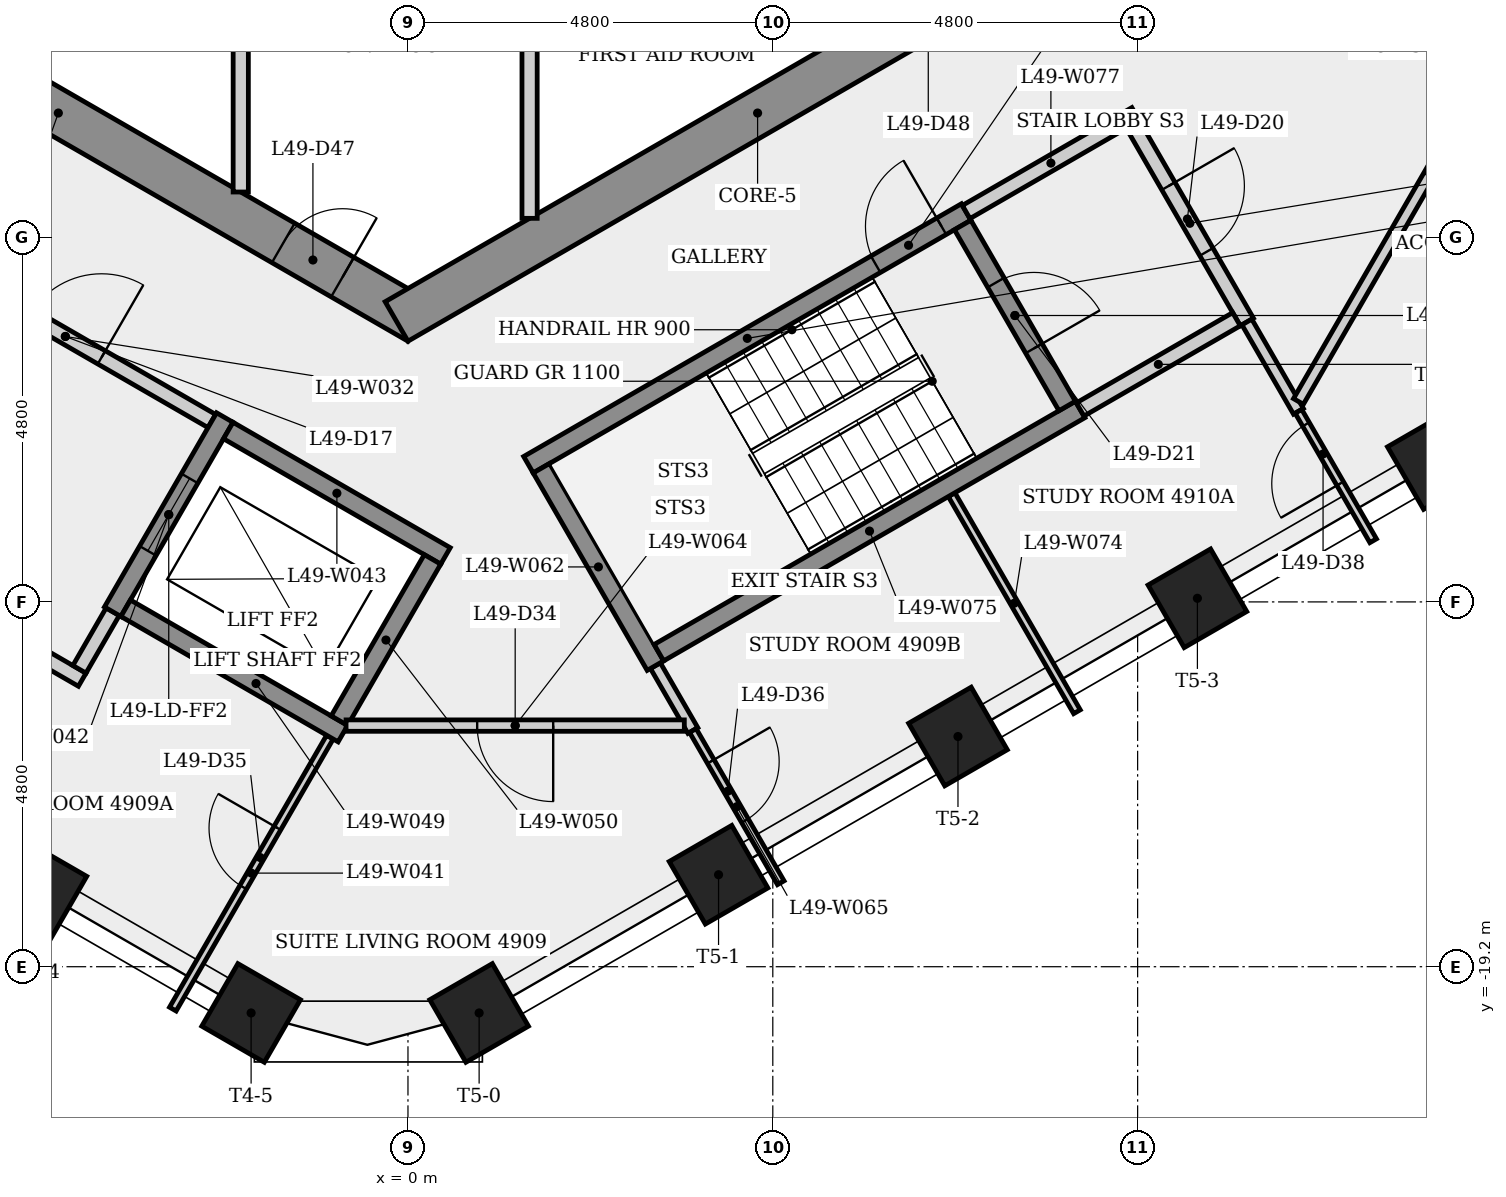
"""IFC4 building model, lengths in metres.
Left out: names, types, materials, properties, quantities, classifications, styles, units other than length and angle.
Written with IfcOpenShell. Run it as: python <this file> out.ifc"""

import sys

from ifc_helpers import new_model, si_unit, direction, frame, frame_2d, origin, origin_2d, place, context, subcontext, project, spatial, rectangle, extrude, element, fill, save


model = new_model("IFC4")
c1 = context("Model", 3, precision=1e-05, world=origin(), true_north=direction((0.0, 1.0)))
c2 = subcontext(c1, "Body", "Model", "MODEL_VIEW")
j1 = project(units=[si_unit("LENGTHUNIT", "METRE"), si_unit("PLANEANGLEUNIT", "RADIAN")], contexts=[c1])
p1 = place(None, origin())
s1 = spatial("IfcSite", under=j1, at=p1, CompositionType="ELEMENT")
p2 = place(p1, origin())
s2 = spatial("IfcBuilding", under=s1, at=p2, CompositionType="ELEMENT")
p3 = place(p2, frame((0.0, 0.0, 183.3)))
s3 = spatial("IfcBuildingStorey", under=s2, at=p3, CompositionType="ELEMENT", Elevation=183.3)
p4 = place(p3, frame((-9.35, -5.225, 0.0), z_axis=(0.0, 0.0, 1.0), x_axis=(0.866023993627, -0.500002442456, 0.0)))
e1 = element("IfcWall", 1, at=p4, inside=s3, PredefinedType="SHEAR", context=c2, shape_type="SweptSolid", body=[
    extrude(rectangle(XDim=10.97, YDim=0.6, at=frame_2d((5.485, 0.0))), origin(), (0.0, 0.0, 1.0), 3.4),
])
p5 = place(p4, frame((3.777, 0.0, 0.0)))
e2 = element("IfcOpeningElement", 2, at=p5, cuts=e1, PredefinedType="OPENING", context=c2, shape_type="SweptSolid", body=[
    extrude(rectangle(XDim=0.9, YDim=2.1, at=frame_2d((0.45, 1.05))), frame((0.0, 0.31, 0.0), z_axis=(0.0, -1.0, 0.0), x_axis=(1.0, 0.0, 0.0)), (0.0, 0.0, 1.0), 0.62),
])
p6 = place(p4, frame((8.903, 0.0, 0.0)))
e3 = element("IfcOpeningElement", 3, at=p6, cuts=e1, PredefinedType="OPENING", context=c2, shape_type="SweptSolid", body=[
    extrude(rectangle(XDim=0.9, YDim=2.1, at=frame_2d((0.45, 1.05))), frame((0.0, 0.31, 0.0), z_axis=(0.0, -1.0, 0.0), x_axis=(1.0, 0.0, 0.0)), (0.0, 0.0, 1.0), 0.62),
])
p7 = place(p3, frame((-0.15, -10.71, 0.0), z_axis=(0.0, 0.0, 1.0), x_axis=(0.866023993627, 0.500002442456, 0.0)))
e4 = element("IfcWall", 4, at=p7, inside=s3, PredefinedType="SHEAR", context=c2, shape_type="SweptSolid", body=[
    extrude(rectangle(XDim=10.97, YDim=0.6, at=frame_2d((5.485, 0.0))), origin(), (0.0, 0.0, 1.0), 3.4),
])
p8 = place(p7, frame((7.628, 0.0, 0.0)))
e5 = element("IfcOpeningElement", 5, at=p8, cuts=e4, PredefinedType="OPENING", context=c2, shape_type="SweptSolid", body=[
    extrude(rectangle(XDim=0.9, YDim=2.1, at=frame_2d((0.45, 1.05))), frame((0.0, 0.31, 0.0), z_axis=(0.0, -1.0, 0.0), x_axis=(1.0, 0.0, 0.0)), (0.0, 0.0, 1.0), 0.62),
])
for number, where, z_axis, x_axis in (
    (6, (-4.875, -18.185, 0.0), (0.0, 0.0, 1.0), (-0.5, -0.866, 0.0)),
    (7, (-2.064, -19.808, 0.0), (0.0, 0.0, 1.0), (-0.5, -0.866, 0.0)),
    (8, (0.936, -19.808, 0.0), (0.0, 0.0, 1.0), (0.5, -0.866, 0.0)),
    (9, (4.086, -17.99, 0.0), (0.0, 0.0, 1.0), (0.5, -0.866, 0.0)),
    (10, (7.236, -16.171, 0.0), (0.0, 0.0, 1.0), (0.5, -0.866, 0.0)),
    (11, (10.386, -14.352, 0.0), (0.0, 0.0, 1.0), (0.5, -0.866, 0.0)),
    (12, (13.536, -12.534, 0.0), (0.0, 0.0, 1.0), (0.5, -0.866, 0.0)),
):
    element("IfcColumn", number, at=place(p3, frame(where, z_axis=z_axis, x_axis=x_axis)), inside=s3, PredefinedType="COLUMN", context=c2, shape_type="SweptSolid", body=[
        extrude(rectangle(XDim=0.95, YDim=0.95, at=origin_2d()), origin(), (0.0, 0.0, 1.0), 3.4),
    ])
p9 = place(p3, frame((-8.356, -13.073, 0.0), z_axis=(0.0, 0.0, 1.0), x_axis=(0.866038532462, -0.499977259774, 0.0)))
e13 = element("IfcWall", 13, at=p9, inside=s3, PredefinedType="PARTITIONING", context=c2, shape_type="SweptSolid", body=[
    extrude(rectangle(XDim=4.7, YDim=0.2, at=frame_2d((2.35, 0.0))), origin(), (0.0, 0.0, 1.0), 3.0),
])
p10 = place(p3, frame((-6.435, -9.795, 0.0), z_axis=(0.0, 0.0, 1.0), x_axis=(0.866012907634, -0.500021643343, 0.0)))
e14 = element("IfcWall", 14, at=p10, inside=s3, PredefinedType="PARTITIONING", context=c2, shape_type="SweptSolid", body=[
    extrude(rectangle(XDim=4.45, YDim=0.2, at=frame_2d((2.225, 0.0))), origin(), (0.0, 0.0, 1.0), 3.0),
])
p11 = place(p10, frame((1.675, 0.0, 0.0)))
e15 = element("IfcOpeningElement", 15, at=p11, cuts=e14, PredefinedType="OPENING", context=c2, shape_type="SweptSolid", body=[
    extrude(rectangle(XDim=1.1, YDim=2.1, at=frame_2d((0.55, 1.05))), frame((0.0, 0.11, 0.0), z_axis=(0.0, -1.0, 0.0), x_axis=(1.0, 0.0, 0.0)), (0.0, 0.0, 1.0), 0.22),
])
p12 = place(p3, frame((-3.885, -14.529, 0.0), z_axis=(0.0, 0.0, 1.0), x_axis=(-0.499859285417, -0.866106630146, 0.0)))
e16 = element("IfcWall", 16, at=p12, inside=s3, PredefinedType="PARTITIONING", context=c2, shape_type="SweptSolid", body=[
    extrude(rectangle(XDim=0.875, YDim=0.2, at=frame_2d((0.438, 0.0))), origin(), (0.0, 0.0, 1.0), 3.0),
])
p13 = place(p3, frame((-3.094, -19.758, 0.0), z_axis=(0.0, 0.0, 1.0), x_axis=(0.500027577057, 0.866009481578, 0.0)))
e17 = element("IfcWall", 17, at=p13, inside=s3, PredefinedType="PARTITIONING", context=c2, shape_type="SweptSolid", body=[
    extrude(rectangle(XDim=4.133, YDim=0.1, at=frame_2d((2.066, 0.0))), origin(), (0.0, 0.0, 1.0), 3.0),
])
p14 = place(p13, frame((1.852, 0.0, 0.0)))
e18 = element("IfcOpeningElement", 18, at=p14, cuts=e17, PredefinedType="OPENING", context=c2, shape_type="SweptSolid", body=[
    extrude(rectangle(XDim=0.9, YDim=2.1, at=frame_2d((0.45, 1.05))), frame((0.0, 0.06, 0.0), z_axis=(0.0, -1.0, 0.0), x_axis=(1.0, 0.0, 0.0)), (0.0, 0.0, 1.0), 0.12),
])
p15 = place(p3, frame((-2.41, -11.974, 0.0), z_axis=(0.0, 0.0, 1.0), x_axis=(-0.500001826776, -0.866024349092, 0.0)))
e19 = element("IfcWall", 19, at=p15, inside=s3, PredefinedType="SHEAR", context=c2, shape_type="SweptSolid", body=[
    extrude(rectangle(XDim=2.95, YDim=0.25, at=frame_2d((1.475, 0.0))), origin(), (0.0, 0.0, 1.0), 3.0),
])
p16 = place(p15, frame((0.925, 0.0, 0.0)))
e20 = element("IfcOpeningElement", 20, at=p16, cuts=e19, PredefinedType="OPENING", context=c2, shape_type="SweptSolid", body=[
    extrude(rectangle(XDim=1.1, YDim=2.1, at=frame_2d((0.55, 1.05))), frame((0.0, 0.135, 0.0), z_axis=(0.0, -1.0, 0.0), x_axis=(1.0, 0.0, 0.0)), (0.0, 0.0, 1.0), 0.27),
])
p17 = place(p3, frame((-2.364, -12.145, 0.0), z_axis=(0.0, 0.0, 1.0), x_axis=(0.866040211805, -0.499974350878, 0.0)))
e21 = element("IfcWall", 21, at=p17, inside=s3, PredefinedType="SHEAR", context=c2, shape_type="SweptSolid", body=[
    extrude(rectangle(XDim=3.3, YDim=0.25, at=frame_2d((1.65, 0.0))), origin(), (0.0, 0.0, 1.0), 3.0),
])
p18 = place(p3, frame((-2.2, -5.25, 0.0), z_axis=(0.0, 0.0, 1.0), x_axis=(0.0, -1.0, 0.0)))
e22 = element("IfcWall", 22, at=p18, inside=s3, PredefinedType="PARTITIONING", context=c2, shape_type="SweptSolid", body=[
    extrude(rectangle(XDim=3.757, YDim=0.2, at=frame_2d((1.878, 0.0))), origin(), (0.0, 0.0, 1.0), 3.0),
])
p19 = place(p3, frame((-0.856, -16.133, 0.0), z_axis=(0.0, 0.0, 1.0), x_axis=(-0.866021716278, 0.500006386895, 0.0)))
e23 = element("IfcWall", 23, at=p19, inside=s3, PredefinedType="SHEAR", context=c2, shape_type="SweptSolid", body=[
    extrude(rectangle(XDim=3.3, YDim=0.25, at=frame_2d((1.65, 0.0))), origin(), (0.0, 0.0, 1.0), 3.0),
])
p20 = place(p3, frame((-0.902, -15.962, 0.0), z_axis=(0.0, 0.0, 1.0), x_axis=(0.500061746146, 0.865989751695, 0.0)))
e24 = element("IfcWall", 24, at=p20, inside=s3, PredefinedType="SHEAR", context=c2, shape_type="SweptSolid", body=[
    extrude(rectangle(XDim=2.45, YDim=0.25, at=frame_2d((1.225, 0.0))), origin(), (0.0, 0.0, 1.0), 3.4),
])
p21 = place(p3, frame((1.6, -5.25, 0.0), z_axis=(0.0, 0.0, 1.0), x_axis=(0.0, -1.0, 0.0)))
e25 = element("IfcWall", 25, at=p21, inside=s3, PredefinedType="PARTITIONING", context=c2, shape_type="SweptSolid", body=[
    extrude(rectangle(XDim=4.103, YDim=0.2, at=frame_2d((2.052, 0.0))), origin(), (0.0, 0.0, 1.0), 3.0),
])
p22 = place(p3, frame((1.585, -12.595, 0.0), z_axis=(0.0, 0.0, 1.0), x_axis=(0.866036417653, 0.499980922934, 0.0)))
e26 = element("IfcWall", 26, at=p22, inside=s3, PredefinedType="SHEAR", context=c2, shape_type="SweptSolid", body=[
    extrude(rectangle(XDim=6.65, YDim=0.25, at=frame_2d((3.325, 0.0))), origin(), (0.0, 0.0, 1.0), 3.0),
])
p23 = place(p22, frame((5.275, 0.0, 0.0)))
e27 = element("IfcOpeningElement", 27, at=p23, cuts=e26, PredefinedType="OPENING", context=c2, shape_type="SweptSolid", body=[
    extrude(rectangle(XDim=1.0, YDim=2.1, at=frame_2d((0.5, 1.05))), frame((0.0, 0.135, 0.0), z_axis=(0.0, -1.0, 0.0), x_axis=(1.0, 0.0, 0.0)), (0.0, 0.0, 1.0), 0.27),
])
p24 = place(p3, frame((3.256, -15.239, 0.0), z_axis=(0.0, 0.0, 1.0), x_axis=(0.499815364442, -0.866131976934, 0.0)))
e28 = element("IfcWall", 28, at=p24, inside=s3, PredefinedType="PARTITIONING", context=c2, shape_type="SweptSolid", body=[
    extrude(rectangle(XDim=0.986, YDim=0.15, at=frame_2d((0.493, 0.0))), origin(), (0.0, 0.0, 1.0), 3.0),
])
p25 = place(p3, frame((3.256, -15.239, 0.0), z_axis=(0.0, 0.0, 1.0), x_axis=(-0.50002537861, 0.866010750942, 0.0)))
e29 = element("IfcWall", 29, at=p25, inside=s3, PredefinedType="SHEAR", context=c2, shape_type="SweptSolid", body=[
    extrude(rectangle(XDim=3.0, YDim=0.25, at=frame_2d((1.5, 0.0))), origin(), (0.0, 0.0, 1.0), 3.0),
])
p26 = place(p3, frame((3.636, -16.028, 0.0), z_axis=(0.0, 0.0, 1.0), x_axis=(-1.0, 0.0, 0.0)))
e30 = element("IfcWall", 30, at=p26, inside=s3, PredefinedType="PARTITIONING", context=c2, shape_type="SweptSolid", body=[
    extrude(rectangle(XDim=4.451, YDim=0.15, at=frame_2d((2.225, 0.0))), origin(), (0.0, 0.0, 1.0), 3.0),
])
p27 = place(p26, frame((1.725, 0.0, 0.0)))
e31 = element("IfcOpeningElement", 31, at=p27, cuts=e30, PredefinedType="OPENING", context=c2, shape_type="SweptSolid", body=[
    extrude(rectangle(XDim=1.0, YDim=2.1, at=frame_2d((0.5, 1.05))), frame((0.0, 0.085, 0.0), z_axis=(0.0, -1.0, 0.0), x_axis=(1.0, 0.0, 0.0)), (0.0, 0.0, 1.0), 0.17),
])
p28 = place(p3, frame((3.748, -16.093, 0.0), z_axis=(0.0, 0.0, 1.0), x_axis=(0.500078837292, -0.865979882268, 0.0)))
e32 = element("IfcWall", 32, at=p28, inside=s3, PredefinedType="PARTITIONING", context=c2, shape_type="SweptSolid", body=[
    extrude(rectangle(XDim=2.313, YDim=0.1, at=frame_2d((1.156, 0.0))), origin(), (0.0, 0.0, 1.0), 3.0),
])
p29 = place(p28, frame((0.471, 0.0, 0.0)))
e33 = element("IfcOpeningElement", 33, at=p29, cuts=e32, PredefinedType="OPENING", context=c2, shape_type="SweptSolid", body=[
    extrude(rectangle(XDim=0.9, YDim=2.1, at=frame_2d((0.45, 1.05))), frame((0.0, 0.06, 0.0), z_axis=(0.0, -1.0, 0.0), x_axis=(1.0, 0.0, 0.0)), (0.0, 0.0, 1.0), 0.12),
])
p30 = place(p3, frame((7.153, -12.989, 0.0), z_axis=(0.0, 0.0, 1.0), x_axis=(0.500055614084, -0.865993292597, 0.0)))
e34 = element("IfcWall", 34, at=p30, inside=s3, PredefinedType="PARTITIONING", context=c2, shape_type="SweptSolid", body=[
    extrude(rectangle(XDim=3.298, YDim=0.1, at=frame_2d((1.649, 0.0))), origin(), (0.0, 0.0, 1.0), 3.0),
])
p31 = place(p3, frame((3.301, -15.068, 0.0), z_axis=(0.0, 0.0, 1.0), x_axis=(0.866035036182, 0.499983315828, 0.0)))
e35 = element("IfcWall", 35, at=p31, inside=s3, PredefinedType="SHEAR", context=c2, shape_type="SweptSolid", body=[
    extrude(rectangle(XDim=6.4, YDim=0.25, at=frame_2d((3.2, 0.0))), origin(), (0.0, 0.0, 1.0), 3.0),
])
p32 = place(p3, frame((7.298, -9.441, 0.0), z_axis=(0.0, 0.0, 1.0), x_axis=(0.500034990121, -0.866005201286, 0.0)))
e36 = element("IfcWall", 36, at=p32, inside=s3, PredefinedType="SHEAR", context=c2, shape_type="SweptSolid", body=[
    extrude(rectangle(XDim=2.75, YDim=0.25, at=frame_2d((1.375, 0.0))), origin(), (0.0, 0.0, 1.0), 3.0),
])
p33 = place(p32, frame((0.875, 0.0, 0.0)))
e37 = element("IfcOpeningElement", 37, at=p33, cuts=e36, PredefinedType="OPENING", context=c2, shape_type="SweptSolid", body=[
    extrude(rectangle(XDim=1.0, YDim=2.1, at=frame_2d((0.5, 1.05))), frame((0.0, 0.135, 0.0), z_axis=(0.0, -1.0, 0.0), x_axis=(1.0, 0.0, 0.0)), (0.0, 0.0, 1.0), 0.27),
])
p34 = place(p3, frame((7.344, -9.27, 0.0), z_axis=(0.0, 0.0, 1.0), x_axis=(0.866005588531, 0.500034319456, 0.0)))
e38 = element("IfcWall", 38, at=p34, inside=s3, PredefinedType="PARTITIONING", context=c2, shape_type="SweptSolid", body=[
    extrude(rectangle(XDim=2.575, YDim=0.2, at=frame_2d((1.288, 0.0))), origin(), (0.0, 0.0, 1.0), 3.0),
])
p35 = place(p3, frame((9.537, -8.119, 0.0), z_axis=(0.0, 0.0, 1.0), x_axis=(0.499990139034, -0.866031096941, 0.0)))
e39 = element("IfcWall", 39, at=p35, inside=s3, PredefinedType="PARTITIONING", context=c2, shape_type="SweptSolid", body=[
    extrude(rectangle(XDim=3.0, YDim=0.2, at=frame_2d((1.5, 0.0))), origin(), (0.0, 0.0, 1.0), 3.0),
])
p36 = place(p35, frame((0.935, 0.0, 0.0)))
e40 = element("IfcOpeningElement", 40, at=p36, cuts=e39, PredefinedType="OPENING", context=c2, shape_type="SweptSolid", body=[
    extrude(rectangle(XDim=1.0, YDim=2.1, at=frame_2d((0.5, 1.05))), frame((0.0, 0.11, 0.0), z_axis=(0.0, -1.0, 0.0), x_axis=(1.0, 0.0, 0.0)), (0.0, 0.0, 1.0), 0.22),
])
p37 = place(p3, frame((10.901, -10.681, 0.0), z_axis=(0.0, 0.0, 1.0), x_axis=(-0.866007538022, -0.500030943131, 0.0)))
e41 = element("IfcWall", 41, at=p37, inside=s3, PredefinedType="PARTITIONING", context=c2, shape_type="SweptSolid", body=[
    extrude(rectangle(XDim=2.375, YDim=0.2, at=frame_2d((1.188, 0.0))), origin(), (0.0, 0.0, 1.0), 3.0),
])
p38 = place(p3, frame((11.716, -11.893, 0.0), z_axis=(0.0, 0.0, 1.0), x_axis=(-0.499872974073, 0.866098729817, 0.0)))
e42 = element("IfcWall", 42, at=p38, inside=s3, PredefinedType="PARTITIONING", context=c2, shape_type="SweptSolid", body=[
    extrude(rectangle(XDim=1.357, YDim=0.15, at=frame_2d((0.679, 0.0))), origin(), (0.0, 0.0, 1.0), 3.0),
])
p39 = place(p3, frame((12.699, -13.595, 0.0), z_axis=(0.0, 0.0, 1.0), x_axis=(-0.500052080135, 0.865995333216, 0.0)))
e43 = element("IfcWall", 43, at=p39, inside=s3, PredefinedType="PARTITIONING", context=c2, shape_type="SweptSolid", body=[
    extrude(rectangle(XDim=1.966, YDim=0.1, at=frame_2d((0.983, 0.0))), origin(), (0.0, 0.0, 1.0), 3.0),
])
p40 = place(p39, frame((0.869, 0.0, 0.0)))
e44 = element("IfcOpeningElement", 44, at=p40, cuts=e43, PredefinedType="OPENING", context=c2, shape_type="SweptSolid", body=[
    extrude(rectangle(XDim=0.9, YDim=2.1, at=frame_2d((0.45, 1.05))), frame((0.0, 0.06, 0.0), z_axis=(0.0, -1.0, 0.0), x_axis=(1.0, 0.0, 0.0)), (0.0, 0.0, 1.0), 0.12),
])
p41 = place(p3, frame((15.646, -4.956, 0.0), z_axis=(0.0, 0.0, 1.0), x_axis=(-0.499997603866, -0.866026787189, 0.0)))
e45 = element("IfcWall", 45, at=p41, inside=s3, PredefinedType="PARTITIONING", context=c2, shape_type="SweptSolid", body=[
    extrude(rectangle(XDim=7.86, YDim=0.15, at=frame_2d((3.93, 0.0))), origin(), (0.0, 0.0, 1.0), 3.0),
])
p42 = place(p41, frame((3.43, 0.0, 0.0)))
e46 = element("IfcOpeningElement", 46, at=p42, cuts=e45, PredefinedType="OPENING", context=c2, shape_type="SweptSolid", body=[
    extrude(rectangle(XDim=1.0, YDim=2.1, at=frame_2d((0.5, 1.05))), frame((0.0, 0.085, 0.0), z_axis=(0.0, -1.0, 0.0), x_axis=(1.0, 0.0, 0.0)), (0.0, 0.0, 1.0), 0.17),
])
p43 = place(p11, origin())
e47 = element("IfcDoor", 47, at=p43, inside=s3, OperationType="SINGLE_SWING_RIGHT", PredefinedType="DOOR", context=c2, shape_type="SweptSolid", body=[
    extrude(rectangle(XDim=1.1, YDim=2.1, at=frame_2d((0.55, 1.05))), frame((0.0, 0.025, 0.0), z_axis=(0.0, -1.0, 0.0), x_axis=(1.0, 0.0, 0.0)), (0.0, 0.0, 1.0), 0.05),
])
fill(e15, e47)
p44 = place(p16, origin())
e48 = element("IfcDoor", 48, at=p44, inside=s3, OperationType="SLIDING_TO_LEFT", PredefinedType="DOOR", context=c2, shape_type="SweptSolid", body=[
    extrude(rectangle(XDim=1.1, YDim=2.1, at=frame_2d((0.55, 1.05))), frame((0.0, 0.025, 0.0), z_axis=(0.0, -1.0, 0.0), x_axis=(1.0, 0.0, 0.0)), (0.0, 0.0, 1.0), 0.05),
])
fill(e20, e48)
p45 = place(p23, origin())
e49 = element("IfcDoor", 49, at=p45, inside=s3, OperationType="SINGLE_SWING_RIGHT", PredefinedType="DOOR", context=c2, shape_type="SweptSolid", body=[
    extrude(rectangle(XDim=1.0, YDim=2.1, at=frame_2d((0.5, 1.05))), frame((0.0, 0.025, 0.0), z_axis=(0.0, -1.0, 0.0), x_axis=(1.0, 0.0, 0.0)), (0.0, 0.0, 1.0), 0.05),
])
fill(e27, e49)
p46 = place(p36, origin())
e50 = element("IfcDoor", 50, at=p46, inside=s3, OperationType="SINGLE_SWING_LEFT", PredefinedType="DOOR", context=c2, shape_type="SweptSolid", body=[
    extrude(rectangle(XDim=1.0, YDim=2.1, at=frame_2d((0.5, 1.05))), frame((0.0, 0.025, 0.0), z_axis=(0.0, -1.0, 0.0), x_axis=(1.0, 0.0, 0.0)), (0.0, 0.0, 1.0), 0.05),
])
fill(e40, e50)
p47 = place(p33, origin())
e51 = element("IfcDoor", 51, at=p47, inside=s3, OperationType="SINGLE_SWING_RIGHT", PredefinedType="DOOR", context=c2, shape_type="SweptSolid", body=[
    extrude(rectangle(XDim=1.0, YDim=2.1, at=frame_2d((0.5, 1.05))), frame((0.0, 0.025, 0.0), z_axis=(0.0, -1.0, 0.0), x_axis=(1.0, 0.0, 0.0)), (0.0, 0.0, 1.0), 0.05),
])
fill(e37, e51)
p48 = place(p27, origin())
e52 = element("IfcDoor", 52, at=p48, inside=s3, OperationType="SINGLE_SWING_LEFT", PredefinedType="DOOR", context=c2, shape_type="SweptSolid", body=[
    extrude(rectangle(XDim=1.0, YDim=2.1, at=frame_2d((0.5, 1.05))), frame((0.0, 0.025, 0.0), z_axis=(0.0, -1.0, 0.0), x_axis=(1.0, 0.0, 0.0)), (0.0, 0.0, 1.0), 0.05),
])
fill(e31, e52)
p49 = place(p14, origin())
e53 = element("IfcDoor", 53, at=p49, inside=s3, OperationType="SINGLE_SWING_RIGHT", PredefinedType="DOOR", context=c2, shape_type="SweptSolid", body=[
    extrude(rectangle(XDim=0.9, YDim=2.1, at=frame_2d((0.45, 1.05))), frame((0.0, 0.025, 0.0), z_axis=(0.0, -1.0, 0.0), x_axis=(1.0, 0.0, 0.0)), (0.0, 0.0, 1.0), 0.05),
])
fill(e18, e53)
p50 = place(p29, origin())
e54 = element("IfcDoor", 54, at=p50, inside=s3, OperationType="SINGLE_SWING_LEFT", PredefinedType="DOOR", context=c2, shape_type="SweptSolid", body=[
    extrude(rectangle(XDim=0.9, YDim=2.1, at=frame_2d((0.45, 1.05))), frame((0.0, 0.025, 0.0), z_axis=(0.0, -1.0, 0.0), x_axis=(1.0, 0.0, 0.0)), (0.0, 0.0, 1.0), 0.05),
])
fill(e33, e54)
p51 = place(p40, origin())
e55 = element("IfcDoor", 55, at=p51, inside=s3, OperationType="SINGLE_SWING_LEFT", PredefinedType="DOOR", context=c2, shape_type="SweptSolid", body=[
    extrude(rectangle(XDim=0.9, YDim=2.1, at=frame_2d((0.45, 1.05))), frame((0.0, 0.025, 0.0), z_axis=(0.0, -1.0, 0.0), x_axis=(1.0, 0.0, 0.0)), (0.0, 0.0, 1.0), 0.05),
])
fill(e44, e55)
p52 = place(p6, origin())
e56 = element("IfcDoor", 56, at=p52, inside=s3, OperationType="SINGLE_SWING_RIGHT", PredefinedType="DOOR", context=c2, shape_type="SweptSolid", body=[
    extrude(rectangle(XDim=0.9, YDim=2.1, at=frame_2d((0.45, 1.05))), frame((0.0, 0.025, 0.0), z_axis=(0.0, -1.0, 0.0), x_axis=(1.0, 0.0, 0.0)), (0.0, 0.0, 1.0), 0.05),
])
fill(e3, e56)
save(model, sys.argv[1])
